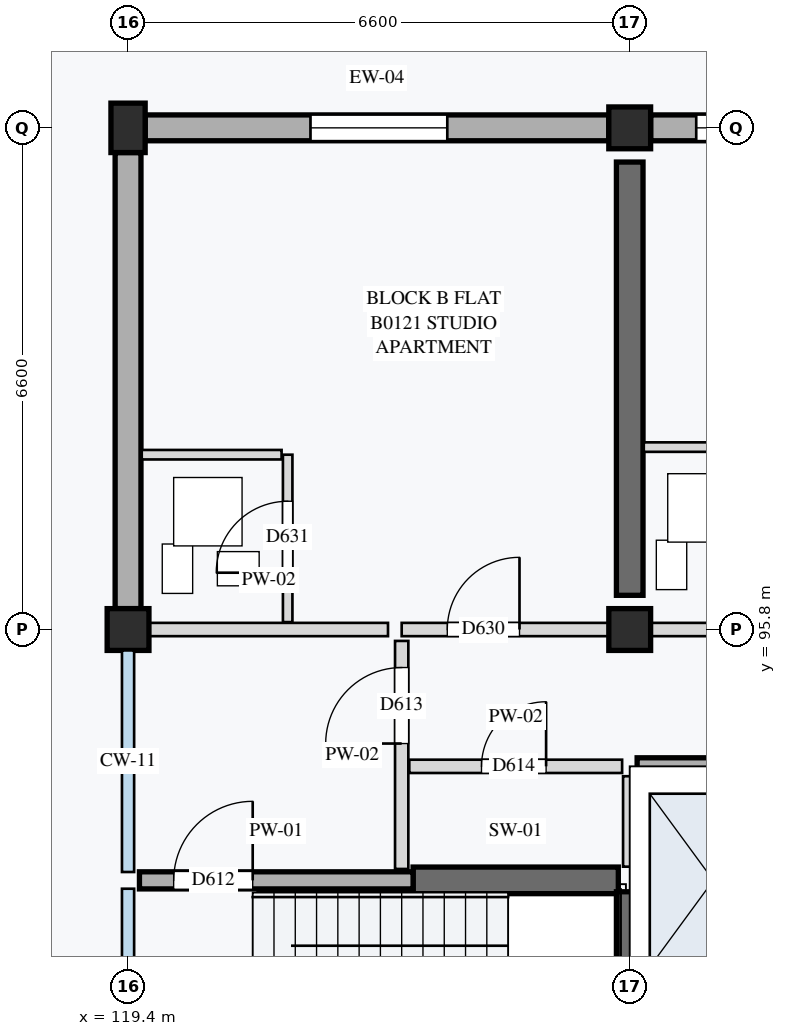
"""IFC4 building model, lengths in metres.
Left out: names, types, materials, properties, quantities, classifications, styles, units other than length and angle.
Written with IfcOpenShell. Run it as: python <this file> out.ifc"""

import sys

from ifc_helpers import new_model, si_unit, direction, frame, frame_2d, origin, origin_2d, place, context, subcontext, project, spatial, rectangle, extrude, element, fill, save


model = new_model("IFC4")
c1 = context("Model", 3, precision=1e-05, world=origin(), true_north=direction((0.0, 1.0)))
c2 = subcontext(c1, "Body", "Model", "MODEL_VIEW")
j1 = project(units=[si_unit("LENGTHUNIT", "METRE"), si_unit("PLANEANGLEUNIT", "RADIAN")], contexts=[c1])
p1 = place(None, origin())
s1 = spatial("IfcSite", under=j1, at=p1, CompositionType="ELEMENT")
p2 = place(p1, origin())
s2 = spatial("IfcBuilding", under=s1, at=p2, CompositionType="ELEMENT")
p3 = place(p2, frame((0.0, 0.0, 4.2)))
s3 = spatial("IfcBuildingStorey", under=s2, at=p3, CompositionType="ELEMENT", Elevation=4.2)
p4 = place(p3, frame((119.4, 95.8, 0.0), z_axis=(0.0, 0.0, 1.0), x_axis=(1.0, 0.0, 0.0)))
e1 = element("IfcColumn", 1, at=p4, inside=s3, PredefinedType="COLUMN", context=c2, shape_type="SweptSolid", body=[
    extrude(rectangle(XDim=0.55, YDim=0.55, at=origin_2d()), origin(), (0.0, 0.0, 1.0), 4.2),
])
p5 = place(p3, frame((119.4, 102.4, 0.0), z_axis=(0.0, 0.0, 1.0), x_axis=(1.0, 0.0, 0.0)))
e2 = element("IfcColumn", 2, at=p5, inside=s3, PredefinedType="COLUMN", context=c2, shape_type="SweptSolid", body=[
    extrude(rectangle(XDim=0.45, YDim=0.65, at=origin_2d()), origin(), (0.0, 0.0, 1.0), 4.2),
])
for number, where, z_axis, x_axis in (
    (3, (126.0, 95.8, 0.0), (0.0, 0.0, 1.0), (1.0, 0.0, 0.0)),
    (4, (126.0, 102.4, 0.0), (0.0, 0.0, 1.0), (1.0, 0.0, 0.0)),
):
    element("IfcColumn", number, at=place(p3, frame(where, z_axis=z_axis, x_axis=x_axis)), inside=s3, PredefinedType="COLUMN", context=c2, shape_type="SweptSolid", body=[
        extrude(rectangle(XDim=0.55, YDim=0.55, at=origin_2d()), origin(), (0.0, 0.0, 1.0), 4.2),
    ])
p6 = place(p3, frame((123.15, 92.5, 0.0), z_axis=(0.0, 0.0, 1.0), x_axis=(1.0, 0.0, 0.0)))
e5 = element("IfcWall", 5, at=p6, inside=s3, PredefinedType="SHEAR", context=c2, shape_type="SweptSolid", body=[
    extrude(rectangle(XDim=2.7, YDim=0.35, at=frame_2d((1.35, 0.0))), origin(), (0.0, 0.0, 1.0), 3.96),
])
p7 = place(p3, frame((126.0, 89.55, 0.0), z_axis=(0.0, 0.0, 1.0), x_axis=(0.0, 1.0, 0.0)))
e6 = element("IfcWall", 6, at=p7, inside=s3, PredefinedType="SHEAR", context=c2, shape_type="SweptSolid", body=[
    extrude(rectangle(XDim=2.8, YDim=0.35, at=frame_2d((1.4, 0.0))), origin(), (0.0, 0.0, 1.0), 3.96),
])
p8 = place(p3, frame((126.0, 96.25, 0.0), z_axis=(0.0, 0.0, 1.0), x_axis=(0.0, 1.0, 0.0)))
e7 = element("IfcWall", 7, at=p8, inside=s3, PredefinedType="SHEAR", context=c2, shape_type="SweptSolid", body=[
    extrude(rectangle(XDim=5.7, YDim=0.35, at=frame_2d((2.85, 0.0))), origin(), (0.0, 0.0, 1.0), 3.96),
])
p9 = place(p3, frame((119.625, 102.4, 0.0), z_axis=(0.0, 0.0, 1.0), x_axis=(1.0, 0.0, 0.0)))
e8 = element("IfcWall", 8, at=p9, inside=s3, PredefinedType="STANDARD", context=c2, shape_type="SweptSolid", body=[
    extrude(rectangle(XDim=6.1, YDim=0.34, at=frame_2d((3.05, 0.0))), origin(), (0.0, 0.0, 1.0), 3.6),
])
p10 = place(p9, frame((2.175, 0.0, 0.85)))
e9 = element("IfcOpeningElement", 9, at=p10, cuts=e8, PredefinedType="OPENING", context=c2, shape_type="SweptSolid", body=[
    extrude(rectangle(XDim=1.8, YDim=1.35, at=frame_2d((0.9, 0.675))), frame((0.0, 0.18, 0.0), z_axis=(0.0, -1.0, 0.0), x_axis=(1.0, 0.0, 0.0)), (0.0, 0.0, 1.0), 0.36),
])
p11 = place(p3, frame((126.275, 102.4, 0.0), z_axis=(0.0, 0.0, 1.0), x_axis=(1.0, 0.0, 0.0)))
e10 = element("IfcWall", 10, at=p11, inside=s3, PredefinedType="STANDARD", context=c2, shape_type="SweptSolid", body=[
    extrude(rectangle(XDim=6.05, YDim=0.34, at=frame_2d((3.025, 0.0))), origin(), (0.0, 0.0, 1.0), 3.6),
])
p12 = place(p11, frame((0.6, 0.0, 0.85)))
e11 = element("IfcOpeningElement", 11, at=p12, cuts=e10, PredefinedType="OPENING", context=c2, shape_type="SweptSolid", body=[
    extrude(rectangle(XDim=1.8, YDim=1.35, at=frame_2d((0.9, 0.675))), frame((0.0, 0.18, 0.0), z_axis=(0.0, -1.0, 0.0), x_axis=(1.0, 0.0, 0.0)), (0.0, 0.0, 1.0), 0.36),
])
p13 = place(p11, frame((4.025, 0.0, 0.85)))
e12 = element("IfcOpeningElement", 12, at=p13, cuts=e10, PredefinedType="OPENING", context=c2, shape_type="SweptSolid", body=[
    extrude(rectangle(XDim=1.5, YDim=1.35, at=frame_2d((0.75, 0.675))), frame((0.0, 0.18, 0.0), z_axis=(0.0, -1.0, 0.0), x_axis=(1.0, 0.0, 0.0)), (0.0, 0.0, 1.0), 0.36),
])
p14 = place(p3, frame((119.4, 96.075, 0.0), z_axis=(0.0, 0.0, 1.0), x_axis=(0.0, 1.0, 0.0)))
e13 = element("IfcWall", 13, at=p14, inside=s3, PredefinedType="STANDARD", context=c2, shape_type="SweptSolid", body=[
    extrude(rectangle(XDim=6.0, YDim=0.34, at=frame_2d((3.0, 0.0))), origin(), (0.0, 0.0, 1.0), 3.65),
])
p15 = place(p3, frame((119.55, 92.5, 0.0), z_axis=(0.0, 0.0, 1.0), x_axis=(1.0, 0.0, 0.0)))
e14 = element("IfcWall", 14, at=p15, inside=s3, PredefinedType="STANDARD", context=c2, shape_type="SweptSolid", body=[
    extrude(rectangle(XDim=3.6, YDim=0.225, at=frame_2d((1.8, 0.0))), origin(), (0.0, 0.0, 1.0), 3.96),
])
p16 = place(p15, frame((0.45, 0.0, 0.0)))
e15 = element("IfcOpeningElement", 15, at=p16, cuts=e14, PredefinedType="OPENING", context=c2, shape_type="SweptSolid", body=[
    extrude(rectangle(XDim=1.04, YDim=2.12, at=frame_2d((0.52, 1.06))), frame((0.0, 0.123, 0.0), z_axis=(0.0, -1.0, 0.0), x_axis=(1.0, 0.0, 0.0)), (0.0, 0.0, 1.0), 0.245),
])
p17 = place(p3, frame((123.0, 92.65, 0.0), z_axis=(0.0, 0.0, 1.0), x_axis=(0.0, 1.0, 0.0)))
e16 = element("IfcWall", 16, at=p17, inside=s3, PredefinedType="PARTITIONING", context=c2, shape_type="SweptSolid", body=[
    extrude(rectangle(XDim=3.0, YDim=0.175, at=frame_2d((1.5, 0.0))), origin(), (0.0, 0.0, 1.0), 3.96),
])
p18 = place(p17, frame((1.65, 0.0, 0.0)))
e17 = element("IfcOpeningElement", 17, at=p18, cuts=e16, PredefinedType="OPENING", context=c2, shape_type="SweptSolid", body=[
    extrude(rectangle(XDim=1.0, YDim=2.1, at=frame_2d((0.5, 1.05))), frame((0.0, 0.097, 0.0), z_axis=(0.0, -1.0, 0.0), x_axis=(1.0, 0.0, 0.0)), (0.0, 0.0, 1.0), 0.195),
])
p19 = place(p3, frame((123.1, 94.0, 0.0), z_axis=(0.0, 0.0, 1.0), x_axis=(1.0, 0.0, 0.0)))
e18 = element("IfcWall", 18, at=p19, inside=s3, PredefinedType="PARTITIONING", context=c2, shape_type="SweptSolid", body=[
    extrude(rectangle(XDim=2.8, YDim=0.175, at=frame_2d((1.4, 0.0))), origin(), (0.0, 0.0, 1.0), 3.96),
])
p20 = place(p19, frame((0.95, 0.0, 0.0)))
e19 = element("IfcOpeningElement", 19, at=p20, cuts=e18, PredefinedType="OPENING", context=c2, shape_type="SweptSolid", body=[
    extrude(rectangle(XDim=0.85, YDim=2.0, at=frame_2d((0.425, 1.0))), frame((0.0, 0.097, 0.0), z_axis=(0.0, -1.0, 0.0), x_axis=(1.0, 0.0, 0.0)), (0.0, 0.0, 1.0), 0.195),
])
p21 = place(p3, frame((126.0, 92.68, 0.0), z_axis=(0.0, 0.0, 1.0), x_axis=(0.0, 1.0, 0.0)))
e20 = element("IfcWall", 20, at=p21, inside=s3, PredefinedType="PARTITIONING", context=c2, shape_type="SweptSolid", body=[
    extrude(rectangle(XDim=1.19, YDim=0.175, at=frame_2d((0.595, 0.0))), origin(), (0.0, 0.0, 1.0), 3.96),
])
p22 = place(p3, frame((126.097, 94.0, 0.0), z_axis=(0.0, 0.0, 1.0), x_axis=(1.0, 0.0, 0.0)))
e21 = element("IfcWall", 21, at=p22, inside=s3, PredefinedType="STANDARD", context=c2, shape_type="SweptSolid", body=[
    extrude(rectangle(XDim=4.023, YDim=0.225, at=frame_2d((2.011, 0.0))), origin(), (0.0, 0.0, 1.0), 3.96),
])
p23 = place(p3, frame((119.68, 95.8, 0.0), z_axis=(0.0, 0.0, 1.0), x_axis=(1.0, 0.0, 0.0)))
e22 = element("IfcWall", 22, at=p23, inside=s3, PredefinedType="PARTITIONING", context=c2, shape_type="SweptSolid", body=[
    extrude(rectangle(XDim=3.14, YDim=0.175, at=frame_2d((1.57, 0.0))), origin(), (0.0, 0.0, 1.0), 3.7),
])
p24 = place(p3, frame((123.0, 95.8, 0.0), z_axis=(0.0, 0.0, 1.0), x_axis=(1.0, 0.0, 0.0)))
e23 = element("IfcWall", 23, at=p24, inside=s3, PredefinedType="PARTITIONING", context=c2, shape_type="SweptSolid", body=[
    extrude(rectangle(XDim=3.0, YDim=0.175, at=frame_2d((1.5, 0.0))), origin(), (0.0, 0.0, 1.0), 3.7),
])
p25 = place(p24, frame((0.6, 0.0, 0.0)))
e24 = element("IfcOpeningElement", 24, at=p25, cuts=e23, PredefinedType="OPENING", context=c2, shape_type="SweptSolid", body=[
    extrude(rectangle(XDim=0.95, YDim=2.1, at=frame_2d((0.475, 1.05))), frame((0.0, 0.097, 0.0), z_axis=(0.0, -1.0, 0.0), x_axis=(1.0, 0.0, 0.0)), (0.0, 0.0, 1.0), 0.195),
])
p26 = place(p3, frame((121.5, 95.897, 0.0), z_axis=(0.0, 0.0, 1.0), x_axis=(0.0, 1.0, 0.0)))
e25 = element("IfcWall", 25, at=p26, inside=s3, PredefinedType="PARTITIONING", context=c2, shape_type="SweptSolid", body=[
    extrude(rectangle(XDim=2.203, YDim=0.125, at=frame_2d((1.101, 0.0))), origin(), (0.0, 0.0, 1.0), 3.96),
])
p27 = place(p26, frame((0.65, 0.0, 0.0)))
e26 = element("IfcOpeningElement", 26, at=p27, cuts=e25, PredefinedType="OPENING", context=c2, shape_type="SweptSolid", body=[
    extrude(rectangle(XDim=0.94, YDim=2.08, at=frame_2d((0.47, 1.04))), frame((0.0, 0.073, 0.0), z_axis=(0.0, -1.0, 0.0), x_axis=(1.0, 0.0, 0.0)), (0.0, 0.0, 1.0), 0.145),
])
p28 = place(p3, frame((119.58, 98.1, 0.0), z_axis=(0.0, 0.0, 1.0), x_axis=(1.0, 0.0, 0.0)))
e27 = element("IfcWall", 27, at=p28, inside=s3, PredefinedType="PARTITIONING", context=c2, shape_type="SweptSolid", body=[
    extrude(rectangle(XDim=1.84, YDim=0.125, at=frame_2d((0.92, 0.0))), origin(), (0.0, 0.0, 1.0), 3.96),
])
p29 = place(p3, frame((126.0, 95.8, 0.0), z_axis=(0.0, 0.0, 1.0), x_axis=(1.0, 0.0, 0.0)))
e28 = element("IfcWall", 28, at=p29, inside=s3, PredefinedType="PARTITIONING", context=c2, shape_type="SweptSolid", body=[
    extrude(rectangle(XDim=6.6, YDim=0.175, at=frame_2d((3.3, 0.0))), origin(), (0.0, 0.0, 1.0), 3.7),
])
p30 = place(p29, frame((3.85, 0.0, 0.0)))
e29 = element("IfcOpeningElement", 29, at=p30, cuts=e28, PredefinedType="OPENING", context=c2, shape_type="SweptSolid", body=[
    extrude(rectangle(XDim=0.92, YDim=2.14, at=frame_2d((0.46, 1.07))), frame((0.0, 0.097, 0.0), z_axis=(0.0, -1.0, 0.0), x_axis=(1.0, 0.0, 0.0)), (0.0, 0.0, 1.0), 0.195),
])
p31 = place(p3, frame((126.185, 98.2, 0.0), z_axis=(0.0, 0.0, 1.0), x_axis=(1.0, 0.0, 0.0)))
e30 = element("IfcWall", 30, at=p31, inside=s3, PredefinedType="PARTITIONING", context=c2, shape_type="SweptSolid", body=[
    extrude(rectangle(XDim=1.635, YDim=0.125, at=frame_2d((0.817, 0.0))), origin(), (0.0, 0.0, 1.0), 3.96),
])
p32 = place(p10, origin())
e31 = element("IfcWindow", 31, at=p32, inside=s3, PartitioningType="SINGLE_PANEL", PredefinedType="WINDOW", context=c2, shape_type="SweptSolid", body=[
    extrude(rectangle(XDim=1.8, YDim=1.35, at=frame_2d((0.9, 0.675))), frame((0.0, 0.03, 0.0), z_axis=(0.0, -1.0, 0.0), x_axis=(1.0, 0.0, 0.0)), (0.0, 0.0, 1.0), 0.06),
])
fill(e9, e31)
p33 = place(p12, origin())
e32 = element("IfcWindow", 32, at=p33, inside=s3, PartitioningType="SINGLE_PANEL", PredefinedType="WINDOW", context=c2, shape_type="SweptSolid", body=[
    extrude(rectangle(XDim=1.8, YDim=1.35, at=frame_2d((0.9, 0.675))), frame((0.0, 0.03, 0.0), z_axis=(0.0, -1.0, 0.0), x_axis=(1.0, 0.0, 0.0)), (0.0, 0.0, 1.0), 0.06),
])
fill(e11, e32)
p34 = place(p16, origin())
e33 = element("IfcDoor", 33, at=p34, inside=s3, OperationType="SINGLE_SWING_RIGHT", PredefinedType="DOOR", context=c2, shape_type="SweptSolid", body=[
    extrude(rectangle(XDim=1.04, YDim=2.12, at=frame_2d((0.52, 1.06))), frame((0.0, 0.025, 0.0), z_axis=(0.0, -1.0, 0.0), x_axis=(1.0, 0.0, 0.0)), (0.0, 0.0, 1.0), 0.05),
])
fill(e15, e33)
p35 = place(p18, origin())
e34 = element("IfcDoor", 34, at=p35, inside=s3, OperationType="SINGLE_SWING_LEFT", PredefinedType="DOOR", context=c2, shape_type="SweptSolid", body=[
    extrude(rectangle(XDim=1.0, YDim=2.1, at=frame_2d((0.5, 1.05))), frame((0.0, 0.025, 0.0), z_axis=(0.0, -1.0, 0.0), x_axis=(1.0, 0.0, 0.0)), (0.0, 0.0, 1.0), 0.05),
])
fill(e17, e34)
p36 = place(p20, origin())
e35 = element("IfcDoor", 35, at=p36, inside=s3, OperationType="SINGLE_SWING_RIGHT", PredefinedType="DOOR", context=c2, shape_type="SweptSolid", body=[
    extrude(rectangle(XDim=0.85, YDim=2.0, at=frame_2d((0.425, 1.0))), frame((0.0, 0.025, 0.0), z_axis=(0.0, -1.0, 0.0), x_axis=(1.0, 0.0, 0.0)), (0.0, 0.0, 1.0), 0.05),
])
fill(e19, e35)
p37 = place(p25, origin())
e36 = element("IfcDoor", 36, at=p37, inside=s3, OperationType="SINGLE_SWING_RIGHT", PredefinedType="DOOR", context=c2, shape_type="SweptSolid", body=[
    extrude(rectangle(XDim=0.95, YDim=2.1, at=frame_2d((0.475, 1.05))), frame((0.0, 0.025, 0.0), z_axis=(0.0, -1.0, 0.0), x_axis=(1.0, 0.0, 0.0)), (0.0, 0.0, 1.0), 0.05),
])
fill(e24, e36)
p38 = place(p27, origin())
e37 = element("IfcDoor", 37, at=p38, inside=s3, OperationType="SINGLE_SWING_LEFT", PredefinedType="DOOR", context=c2, shape_type="SweptSolid", body=[
    extrude(rectangle(XDim=0.94, YDim=2.08, at=frame_2d((0.47, 1.04))), frame((0.0, 0.025, 0.0), z_axis=(0.0, -1.0, 0.0), x_axis=(1.0, 0.0, 0.0)), (0.0, 0.0, 1.0), 0.05),
])
fill(e26, e37)
save(model, sys.argv[1])
